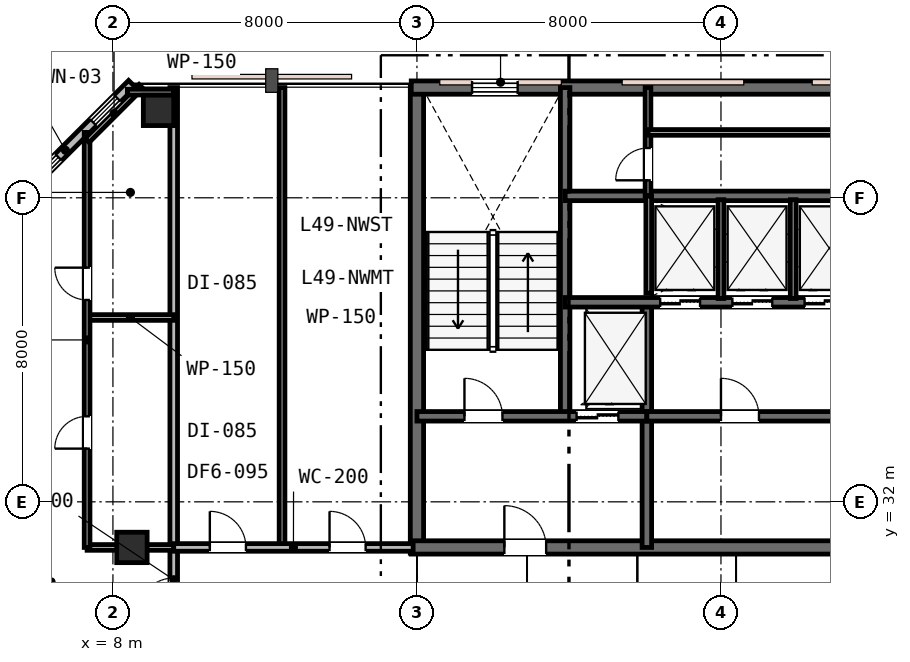
"""IFC4 building model, lengths in metres.
Left out: names, types, materials, properties, quantities, classifications, styles, units other than length and angle.
Written with IfcOpenShell. Run it as: python <this file> out.ifc"""

import sys

from ifc_helpers import new_model, si_unit, direction, frame, frame_2d, origin, origin_2d, place, context, subcontext, project, spatial, rectangle, extrude, element, fill, save


model = new_model("IFC4")
c1 = context("Model", 3, precision=1e-05, world=origin(), true_north=direction((0.0, 1.0)))
c2 = subcontext(c1, "Body", "Model", "MODEL_VIEW")
j1 = project(units=[si_unit("LENGTHUNIT", "METRE"), si_unit("PLANEANGLEUNIT", "RADIAN")], contexts=[c1])
p1 = place(None, origin())
s1 = spatial("IfcSite", under=j1, at=p1, CompositionType="ELEMENT")
p2 = place(p1, origin())
s2 = spatial("IfcBuilding", under=s1, at=p2, CompositionType="ELEMENT")
p3 = place(p2, frame((0.0, 0.0, 190.2)))
s3 = spatial("IfcBuildingStorey", under=s2, at=p3, CompositionType="ELEMENT", Elevation=190.2)
p4 = place(p3, frame((16.0, 30.65, 0.0), z_axis=(0.0, 0.0, 1.0), x_axis=(0.0, 1.0, 0.0)))
e1 = element("IfcWall", 1, at=p4, inside=s3, PredefinedType="SHEAR", context=c2, shape_type="SweptSolid", body=[
    extrude(rectangle(XDim=12.3, YDim=0.35, at=frame_2d((6.15, 0.0))), origin(), (0.0, 0.0, 1.0), 3.6),
])
p5 = place(p3, frame((15.85, 42.9, 0.0), z_axis=(0.0, 0.0, 1.0), x_axis=(1.0, 0.0, 0.0)))
e2 = element("IfcWall", 2, at=p5, inside=s3, PredefinedType="SHEAR", context=c2, shape_type="SweptSolid", body=[
    extrude(rectangle(XDim=24.3, YDim=0.35, at=frame_2d((12.15, 0.0))), origin(), (0.0, 0.0, 1.0), 3.6),
])
p6 = place(p5, frame((1.6, 0.0, 0.95)))
e3 = element("IfcOpeningElement", 3, at=p6, cuts=e2, PredefinedType="OPENING", context=c2, shape_type="SweptSolid", body=[
    extrude(rectangle(XDim=1.2, YDim=1.6, at=frame_2d((0.6, 0.8))), frame((0.0, 0.185, 0.0), z_axis=(0.0, -1.0, 0.0), x_axis=(1.0, 0.0, 0.0)), (0.0, 0.0, 1.0), 0.37),
])
p7 = place(p5, frame((16.5, 0.0, 0.95)))
e4 = element("IfcOpeningElement", 4, at=p7, cuts=e2, PredefinedType="OPENING", context=c2, shape_type="SweptSolid", body=[
    extrude(rectangle(XDim=1.2, YDim=1.6, at=frame_2d((0.6, 0.8))), frame((0.0, 0.185, 0.0), z_axis=(0.0, -1.0, 0.0), x_axis=(1.0, 0.0, 0.0)), (0.0, 0.0, 1.0), 0.37),
])
p8 = place(p5, frame((21.6, 0.0, 0.95)))
e5 = element("IfcOpeningElement", 5, at=p8, cuts=e2, PredefinedType="OPENING", context=c2, shape_type="SweptSolid", body=[
    extrude(rectangle(XDim=1.2, YDim=1.6, at=frame_2d((0.6, 0.8))), frame((0.0, 0.185, 0.0), z_axis=(0.0, -1.0, 0.0), x_axis=(1.0, 0.0, 0.0)), (0.0, 0.0, 1.0), 0.37),
])
p9 = place(p3, frame((15.85, 30.8, 0.0), z_axis=(0.0, 0.0, 1.0), x_axis=(1.0, 0.0, 0.0)))
e6 = element("IfcWall", 6, at=p9, inside=s3, PredefinedType="SHEAR", context=c2, shape_type="SweptSolid", body=[
    extrude(rectangle(XDim=11.2, YDim=0.35, at=frame_2d((5.6, 0.0))), origin(), (0.0, 0.0, 1.0), 3.6),
])
p10 = place(p9, frame((2.45, 0.0, 0.0)))
e7 = element("IfcOpeningElement", 7, at=p10, cuts=e6, PredefinedType="OPENING", context=c2, shape_type="SweptSolid", body=[
    extrude(rectangle(XDim=1.1, YDim=2.15, at=frame_2d((0.55, 1.075))), frame((0.0, 0.185, 0.0), z_axis=(0.0, -1.0, 0.0), x_axis=(1.0, 0.0, 0.0)), (0.0, 0.0, 1.0), 0.37),
])
p11 = place(p3, frame((19.9, 34.25, 0.0), z_axis=(0.0, 0.0, 1.0), x_axis=(0.0, 1.0, 0.0)))
e8 = element("IfcWall", 8, at=p11, inside=s3, PredefinedType="SHEAR", context=c2, shape_type="SweptSolid", body=[
    extrude(rectangle(XDim=8.65, YDim=0.25, at=frame_2d((4.325, 0.0))), origin(), (0.0, 0.0, 1.0), 3.6),
])
p12 = place(p3, frame((22.05, 30.8, 0.0), z_axis=(0.0, 0.0, 1.0), x_axis=(0.0, 1.0, 0.0)))
e9 = element("IfcWall", 9, at=p12, inside=s3, PredefinedType="SHEAR", context=c2, shape_type="SweptSolid", body=[
    extrude(rectangle(XDim=6.45, YDim=0.25, at=frame_2d((3.225, 0.0))), origin(), (0.0, 0.0, 1.0), 3.6),
])
p13 = place(p3, frame((16.0, 34.25, 0.0), z_axis=(0.0, 0.0, 1.0), x_axis=(1.0, 0.0, 0.0)))
e10 = element("IfcWall", 10, at=p13, inside=s3, PredefinedType="SHEAR", context=c2, shape_type="SweptSolid", body=[
    extrude(rectangle(XDim=6.05, YDim=0.25, at=frame_2d((3.025, 0.0))), origin(), (0.0, 0.0, 1.0), 3.6),
])
p14 = place(p13, frame((1.25, 0.0, 0.0)))
e11 = element("IfcOpeningElement", 11, at=p14, cuts=e10, PredefinedType="OPENING", context=c2, shape_type="SweptSolid", body=[
    extrude(rectangle(XDim=1.0, YDim=2.15, at=frame_2d((0.5, 1.075))), frame((0.0, 0.135, 0.0), z_axis=(0.0, -1.0, 0.0), x_axis=(1.0, 0.0, 0.0)), (0.0, 0.0, 1.0), 0.27),
])
p15 = place(p13, frame((4.2, 0.0, 0.0)))
e12 = element("IfcOpeningElement", 12, at=p15, cuts=e10, PredefinedType="OPENING", context=c2, shape_type="SweptSolid", body=[
    extrude(rectangle(XDim=1.1, YDim=2.15, at=frame_2d((0.55, 1.075))), frame((0.0, 0.135, 0.0), z_axis=(0.0, -1.0, 0.0), x_axis=(1.0, 0.0, 0.0)), (0.0, 0.0, 1.0), 0.27),
])
p16 = place(p3, frame((22.05, 34.25, 0.0), z_axis=(0.0, 0.0, 1.0), x_axis=(1.0, 0.0, 0.0)))
e13 = element("IfcWall", 13, at=p16, inside=s3, PredefinedType="SHEAR", context=c2, shape_type="SweptSolid", body=[
    extrude(rectangle(XDim=5.0, YDim=0.25, at=frame_2d((2.5, 0.0))), origin(), (0.0, 0.0, 1.0), 3.6),
])
p17 = place(p16, frame((1.95, 0.0, 0.0)))
e14 = element("IfcOpeningElement", 14, at=p17, cuts=e13, PredefinedType="OPENING", context=c2, shape_type="SweptSolid", body=[
    extrude(rectangle(XDim=1.0, YDim=2.15, at=frame_2d((0.5, 1.075))), frame((0.0, 0.135, 0.0), z_axis=(0.0, -1.0, 0.0), x_axis=(1.0, 0.0, 0.0)), (0.0, 0.0, 1.0), 0.27),
])
p18 = place(p3, frame((19.9, 37.25, 0.0), z_axis=(0.0, 0.0, 1.0), x_axis=(1.0, 0.0, 0.0)))
e15 = element("IfcWall", 15, at=p18, inside=s3, PredefinedType="SHEAR", context=c2, shape_type="SweptSolid", body=[
    extrude(rectangle(XDim=16.2, YDim=0.25, at=frame_2d((8.1, 0.0))), origin(), (0.0, 0.0, 1.0), 3.6),
])
p19 = place(p18, frame((12.55, 0.0, 0.0)))
e16 = element("IfcOpeningElement", 16, at=p19, cuts=e15, PredefinedType="OPENING", context=c2, shape_type="SweptSolid", body=[
    extrude(rectangle(XDim=0.9, YDim=2.15, at=frame_2d((0.45, 1.075))), frame((0.0, 0.135, 0.0), z_axis=(0.0, -1.0, 0.0), x_axis=(1.0, 0.0, 0.0)), (0.0, 0.0, 1.0), 0.27),
])
p20 = place(p18, frame((2.5, 0.0, 0.0)))
e17 = element("IfcOpeningElement", 17, at=p20, cuts=e15, PredefinedType="OPENING", context=c2, shape_type="SweptSolid", body=[
    extrude(rectangle(XDim=1.05, YDim=2.15, at=frame_2d((0.525, 1.075))), frame((0.0, 0.135, 0.0), z_axis=(0.0, -1.0, 0.0), x_axis=(1.0, 0.0, 0.0)), (0.0, 0.0, 1.0), 0.27),
])
p21 = place(p18, frame((4.4, 0.0, 0.0)))
e18 = element("IfcOpeningElement", 18, at=p21, cuts=e15, PredefinedType="OPENING", context=c2, shape_type="SweptSolid", body=[
    extrude(rectangle(XDim=1.05, YDim=2.15, at=frame_2d((0.525, 1.075))), frame((0.0, 0.135, 0.0), z_axis=(0.0, -1.0, 0.0), x_axis=(1.0, 0.0, 0.0)), (0.0, 0.0, 1.0), 0.27),
])
p22 = place(p18, frame((6.3, 0.0, 0.0)))
e19 = element("IfcOpeningElement", 19, at=p22, cuts=e15, PredefinedType="OPENING", context=c2, shape_type="SweptSolid", body=[
    extrude(rectangle(XDim=1.05, YDim=2.15, at=frame_2d((0.525, 1.075))), frame((0.0, 0.135, 0.0), z_axis=(0.0, -1.0, 0.0), x_axis=(1.0, 0.0, 0.0)), (0.0, 0.0, 1.0), 0.27),
])
p23 = place(p3, frame((19.9, 40.05, 0.0), z_axis=(0.0, 0.0, 1.0), x_axis=(1.0, 0.0, 0.0)))
e20 = element("IfcWall", 20, at=p23, inside=s3, PredefinedType="SHEAR", context=c2, shape_type="SweptSolid", body=[
    extrude(rectangle(XDim=12.05, YDim=0.25, at=frame_2d((6.025, 0.0))), origin(), (0.0, 0.0, 1.0), 3.6),
])
for number, where, z_axis, x_axis in (
    (21, (8.5, 30.8, 0.0), (0.0, 0.0, 1.0), (1.0, 0.0, 0.0)),
    (22, (9.2, 42.3, 0.0), (0.0, 0.0, 1.0), (1.0, 0.0, 0.0)),
):
    element("IfcColumn", number, at=place(p3, frame(where, z_axis=z_axis, x_axis=x_axis)), inside=s3, PredefinedType="COLUMN", context=c2, shape_type="SweptSolid", body=[
        extrude(rectangle(XDim=0.8, YDim=0.8, at=origin_2d()), origin(), (0.0, 0.0, 1.0), 3.6),
    ])
p24 = place(p3, frame((8.5, 43.0, 0.0), z_axis=(0.0, 0.0, 1.0), x_axis=(-0.707106781187, -0.707106781187, 0.0)))
e23 = element("IfcWall", 23, at=p24, inside=s3, PredefinedType="STANDARD", context=c2, shape_type="SweptSolid", body=[
    extrude(rectangle(XDim=4.95, YDim=0.25, at=frame_2d((2.475, 0.0))), origin(), (0.0, 0.0, 1.0), 3.33),
])
p25 = place(p24, frame((0.54, 0.0, 0.9)))
e24 = element("IfcOpeningElement", 24, at=p25, cuts=e23, PredefinedType="OPENING", context=c2, shape_type="SweptSolid", body=[
    extrude(rectangle(XDim=0.9, YDim=1.55, at=frame_2d((0.45, 0.775))), frame((0.0, 0.135, 0.0), z_axis=(0.0, -1.0, 0.0), x_axis=(1.0, 0.0, 0.0)), (0.0, 0.0, 1.0), 0.27),
])
p26 = place(p24, frame((2.735, 0.0, 0.85)))
e25 = element("IfcOpeningElement", 25, at=p26, cuts=e23, PredefinedType="OPENING", context=c2, shape_type="SweptSolid", body=[
    extrude(rectangle(XDim=1.2, YDim=1.6, at=frame_2d((0.6, 0.8))), frame((0.0, 0.135, 0.0), z_axis=(0.0, -1.0, 0.0), x_axis=(1.0, 0.0, 0.0)), (0.0, 0.0, 1.0), 0.27),
])
p27 = place(p3, frame((22.1, 37.49, 0.0), z_axis=(0.0, 0.0, 1.0), x_axis=(0.0, 1.0, 0.0)))
e26 = element("IfcWall", 26, at=p27, inside=s3, PredefinedType="PLUMBINGWALL", context=c2, shape_type="SweptSolid", body=[
    extrude(rectangle(XDim=2.56, YDim=0.15, at=frame_2d((1.28, 0.0))), origin(), (0.0, 0.0, 1.0), 3.33),
])
for number, where, z_axis, x_axis in (
    (27, (24.0, 37.35, 0.0), (0.0, 0.0, 1.0), (0.0, 1.0, 0.0)),
    (28, (25.9, 37.35, 0.0), (0.0, 0.0, 1.0), (0.0, 1.0, 0.0)),
):
    element("IfcWall", number, at=place(p3, frame(where, z_axis=z_axis, x_axis=x_axis)), inside=s3, PredefinedType="PLUMBINGWALL", context=c2, shape_type="SweptSolid", body=[
        extrude(rectangle(XDim=2.6, YDim=0.15, at=frame_2d((1.3, 0.0))), origin(), (0.0, 0.0, 1.0), 3.33),
    ])
p28 = place(p3, frame((22.08, 40.05, 0.0), z_axis=(0.0, 0.0, 1.0), x_axis=(0.0, 1.0, 0.0)))
e29 = element("IfcWall", 29, at=p28, inside=s3, PredefinedType="PARTITIONING", context=c2, shape_type="SweptSolid", body=[
    extrude(rectangle(XDim=2.85, YDim=0.15, at=frame_2d((1.425, 0.0))), origin(), (0.0, 0.0, 1.0), 3.33),
])
p29 = place(p28, frame((0.41, 0.0, 0.0)))
e30 = element("IfcOpeningElement", 30, at=p29, cuts=e29, PredefinedType="OPENING", context=c2, shape_type="SweptSolid", body=[
    extrude(rectangle(XDim=0.85, YDim=2.15, at=frame_2d((0.425, 1.075))), frame((0.0, 0.085, 0.0), z_axis=(0.0, -1.0, 0.0), x_axis=(1.0, 0.0, 0.0)), (0.0, 0.0, 1.0), 0.17),
])
p30 = place(p3, frame((22.08, 41.72, 0.0), z_axis=(0.0, 0.0, 1.0), x_axis=(1.0, 0.0, 0.0)))
e31 = element("IfcWall", 31, at=p30, inside=s3, PredefinedType="PARTITIONING", context=c2, shape_type="SweptSolid", body=[
    extrude(rectangle(XDim=11.97, YDim=0.15, at=frame_2d((5.985, 0.0))), origin(), (0.0, 0.0, 1.0), 3.33),
])
p31 = place(p30, frame((5.535, 0.0, 0.0)))
e32 = element("IfcOpeningElement", 32, at=p31, cuts=e31, PredefinedType="OPENING", context=c2, shape_type="SweptSolid", body=[
    extrude(rectangle(XDim=0.9, YDim=2.15, at=frame_2d((0.45, 1.075))), frame((0.0, 0.085, 0.0), z_axis=(0.0, -1.0, 0.0), x_axis=(1.0, 0.0, 0.0)), (0.0, 0.0, 1.0), 0.17),
])
p32 = place(p3, frame((9.6, 17.0, 0.0), z_axis=(0.0, 0.0, 1.0), x_axis=(0.0, 1.0, 0.0)))
e33 = element("IfcWall", 33, at=p32, inside=s3, PredefinedType="PARTITIONING", context=c2, shape_type="SweptSolid", body=[
    extrude(rectangle(XDim=25.9, YDim=0.2, at=frame_2d((12.95, 0.0))), origin(), (0.0, 0.0, 1.0), 2.92),
])
p33 = place(p32, frame((12.045, 0.0, 0.0)))
e34 = element("IfcOpeningElement", 34, at=p33, cuts=e33, PredefinedType="OPENING", context=c2, shape_type="SweptSolid", body=[
    extrude(rectangle(XDim=0.95, YDim=2.15, at=frame_2d((0.475, 1.075))), frame((0.0, 0.11, 0.0), z_axis=(0.0, -1.0, 0.0), x_axis=(1.0, 0.0, 0.0)), (0.0, 0.0, 1.0), 0.22),
])
p34 = place(p32, frame((3.125, 0.0, 0.0)))
e35 = element("IfcOpeningElement", 35, at=p34, cuts=e33, PredefinedType="OPENING", context=c2, shape_type="SweptSolid", body=[
    extrude(rectangle(XDim=0.95, YDim=2.15, at=frame_2d((0.475, 1.075))), frame((0.0, 0.11, 0.0), z_axis=(0.0, -1.0, 0.0), x_axis=(1.0, 0.0, 0.0)), (0.0, 0.0, 1.0), 0.22),
])
p35 = place(p3, frame((7.32, 30.8, 0.0), z_axis=(0.0, 0.0, 1.0), x_axis=(1.0, 0.0, 0.0)))
e36 = element("IfcWall", 36, at=p35, inside=s3, PredefinedType="PARTITIONING", context=c2, shape_type="SweptSolid", body=[
    extrude(rectangle(XDim=2.28, YDim=0.15, at=frame_2d((1.14, 0.0))), origin(), (0.0, 0.0, 1.0), 2.92),
])
p36 = place(p3, frame((7.32, 36.85, 0.0), z_axis=(0.0, 0.0, 1.0), x_axis=(1.0, 0.0, 0.0)))
e37 = element("IfcWall", 37, at=p36, inside=s3, PredefinedType="PARTITIONING", context=c2, shape_type="SweptSolid", body=[
    extrude(rectangle(XDim=2.28, YDim=0.15, at=frame_2d((1.14, 0.0))), origin(), (0.0, 0.0, 1.0), 3.33),
])
p37 = place(p3, frame((7.32, 30.8, 0.0), z_axis=(0.0, 0.0, 1.0), x_axis=(0.0, 1.0, 0.0)))
e38 = element("IfcWall", 38, at=p37, inside=s3, PredefinedType="PARTITIONING", context=c2, shape_type="SweptSolid", body=[
    extrude(rectangle(XDim=10.92, YDim=0.15, at=frame_2d((5.46, 0.0))), origin(), (0.0, 0.0, 1.0), 2.92),
])
p38 = place(p37, frame((2.6, 0.0, 0.0)))
e39 = element("IfcOpeningElement", 39, at=p38, cuts=e38, PredefinedType="OPENING", context=c2, shape_type="SweptSolid", body=[
    extrude(rectangle(XDim=0.85, YDim=2.15, at=frame_2d((0.425, 1.075))), frame((0.0, 0.085, 0.0), z_axis=(0.0, -1.0, 0.0), x_axis=(1.0, 0.0, 0.0)), (0.0, 0.0, 1.0), 0.17),
])
p39 = place(p37, frame((6.512, 0.0, 0.0)))
e40 = element("IfcOpeningElement", 40, at=p39, cuts=e38, PredefinedType="OPENING", context=c2, shape_type="SweptSolid", body=[
    extrude(rectangle(XDim=0.85, YDim=2.15, at=frame_2d((0.425, 1.075))), frame((0.0, 0.085, 0.0), z_axis=(0.0, -1.0, 0.0), x_axis=(1.0, 0.0, 0.0)), (0.0, 0.0, 1.0), 0.17),
])
p40 = place(p3, frame((7.32, 41.509, 0.0), z_axis=(0.0, 0.0, 1.0), x_axis=(0.707106781187, 0.707106781187, 0.0)))
e41 = element("IfcWall", 41, at=p40, inside=s3, PredefinedType="PARTITIONING", context=c2, shape_type="SweptSolid", body=[
    extrude(rectangle(XDim=2.009, YDim=0.15, at=frame_2d((1.004, 0.0))), origin(), (0.0, 0.0, 1.0), 3.33),
])
p41 = place(p3, frame((8.38, 42.78, 0.0), z_axis=(0.0, 0.0, 1.0), x_axis=(1.0, 0.0, 0.0)))
e42 = element("IfcWall", 42, at=p41, inside=s3, PredefinedType="PARTITIONING", context=c2, shape_type="SweptSolid", body=[
    extrude(rectangle(XDim=1.22, YDim=0.15, at=frame_2d((0.61, 0.0))), origin(), (0.0, 0.0, 1.0), 3.02),
])
p42 = place(p3, frame((12.45, 30.8, 0.0), z_axis=(0.0, 0.0, 1.0), x_axis=(0.0, 1.0, 0.0)))
e43 = element("IfcWall", 43, at=p42, inside=s3, PredefinedType="PARTITIONING", context=c2, shape_type="SweptSolid", body=[
    extrude(rectangle(XDim=12.1, YDim=0.15, at=frame_2d((6.05, 0.0))), origin(), (0.0, 0.0, 1.0), 2.92),
])
p43 = place(p3, frame((9.6, 30.8, 0.0), z_axis=(0.0, 0.0, 1.0), x_axis=(1.0, 0.0, 0.0)))
e44 = element("IfcWall", 44, at=p43, inside=s3, PredefinedType="PARTITIONING", context=c2, shape_type="SweptSolid", body=[
    extrude(rectangle(XDim=6.3, YDim=0.2, at=frame_2d((3.15, 0.0))), origin(), (0.0, 0.0, 1.0), 2.92),
])
p44 = place(p43, frame((0.95, 0.0, 0.0)))
e45 = element("IfcOpeningElement", 45, at=p44, cuts=e44, PredefinedType="OPENING", context=c2, shape_type="SweptSolid", body=[
    extrude(rectangle(XDim=0.95, YDim=2.15, at=frame_2d((0.475, 1.075))), frame((0.0, 0.11, 0.0), z_axis=(0.0, -1.0, 0.0), x_axis=(1.0, 0.0, 0.0)), (0.0, 0.0, 1.0), 0.22),
])
p45 = place(p43, frame((4.1, 0.0, 0.0)))
e46 = element("IfcOpeningElement", 46, at=p45, cuts=e44, PredefinedType="OPENING", context=c2, shape_type="SweptSolid", body=[
    extrude(rectangle(XDim=0.95, YDim=2.15, at=frame_2d((0.475, 1.075))), frame((0.0, 0.11, 0.0), z_axis=(0.0, -1.0, 0.0), x_axis=(1.0, 0.0, 0.0)), (0.0, 0.0, 1.0), 0.22),
])
p46 = place(p6, origin())
e47 = element("IfcWindow", 47, at=p46, inside=s3, PartitioningType="SINGLE_PANEL", PredefinedType="WINDOW", context=c2, shape_type="SweptSolid", body=[
    extrude(rectangle(XDim=1.2, YDim=1.6, at=frame_2d((0.6, 0.8))), frame((0.0, 0.03, 0.0), z_axis=(0.0, -1.0, 0.0), x_axis=(1.0, 0.0, 0.0)), (0.0, 0.0, 1.0), 0.06),
])
fill(e3, e47)
p47 = place(p25, origin())
e48 = element("IfcWindow", 48, at=p47, inside=s3, PartitioningType="SINGLE_PANEL", PredefinedType="WINDOW", context=c2, shape_type="SweptSolid", body=[
    extrude(rectangle(XDim=0.9, YDim=1.55, at=frame_2d((0.45, 0.775))), frame((0.0, 0.03, 0.0), z_axis=(0.0, -1.0, 0.0), x_axis=(1.0, 0.0, 0.0)), (0.0, 0.0, 1.0), 0.06),
])
fill(e24, e48)
p48 = place(p26, origin())
e49 = element("IfcWindow", 49, at=p48, inside=s3, PartitioningType="SINGLE_PANEL", PredefinedType="WINDOW", context=c2, shape_type="SweptSolid", body=[
    extrude(rectangle(XDim=1.2, YDim=1.6, at=frame_2d((0.6, 0.8))), frame((0.0, 0.03, 0.0), z_axis=(0.0, -1.0, 0.0), x_axis=(1.0, 0.0, 0.0)), (0.0, 0.0, 1.0), 0.06),
])
fill(e25, e49)
p49 = place(p14, origin())
e50 = element("IfcDoor", 50, at=p49, inside=s3, OperationType="SINGLE_SWING_LEFT", PredefinedType="DOOR", context=c2, shape_type="SweptSolid", body=[
    extrude(rectangle(XDim=1.0, YDim=2.15, at=frame_2d((0.5, 1.075))), frame((0.0, 0.025, 0.0), z_axis=(0.0, -1.0, 0.0), x_axis=(1.0, 0.0, 0.0)), (0.0, 0.0, 1.0), 0.05),
])
fill(e11, e50)
p50 = place(p10, origin())
e51 = element("IfcDoor", 51, at=p50, inside=s3, OperationType="SINGLE_SWING_LEFT", PredefinedType="DOOR", context=c2, shape_type="SweptSolid", body=[
    extrude(rectangle(XDim=1.1, YDim=2.15, at=frame_2d((0.55, 1.075))), frame((0.0, 0.025, 0.0), z_axis=(0.0, -1.0, 0.0), x_axis=(1.0, 0.0, 0.0)), (0.0, 0.0, 1.0), 0.05),
])
fill(e7, e51)
p51 = place(p17, origin())
e52 = element("IfcDoor", 52, at=p51, inside=s3, OperationType="SINGLE_SWING_LEFT", PredefinedType="DOOR", context=c2, shape_type="SweptSolid", body=[
    extrude(rectangle(XDim=1.0, YDim=2.15, at=frame_2d((0.5, 1.075))), frame((0.0, 0.025, 0.0), z_axis=(0.0, -1.0, 0.0), x_axis=(1.0, 0.0, 0.0)), (0.0, 0.0, 1.0), 0.05),
])
fill(e14, e52)
p52 = place(p29, origin())
e53 = element("IfcDoor", 53, at=p52, inside=s3, OperationType="SINGLE_SWING_LEFT", PredefinedType="DOOR", context=c2, shape_type="SweptSolid", body=[
    extrude(rectangle(XDim=0.85, YDim=2.15, at=frame_2d((0.425, 1.075))), frame((0.0, 0.025, 0.0), z_axis=(0.0, -1.0, 0.0), x_axis=(1.0, 0.0, 0.0)), (0.0, 0.0, 1.0), 0.05),
])
fill(e30, e53)
p53 = place(p33, origin())
e54 = element("IfcDoor", 54, at=p53, inside=s3, OperationType="SINGLE_SWING_LEFT", PredefinedType="DOOR", context=c2, shape_type="SweptSolid", body=[
    extrude(rectangle(XDim=0.95, YDim=2.15, at=frame_2d((0.475, 1.075))), frame((0.0, 0.025, 0.0), z_axis=(0.0, -1.0, 0.0), x_axis=(1.0, 0.0, 0.0)), (0.0, 0.0, 1.0), 0.05),
])
fill(e34, e54)
p54 = place(p38, origin())
e55 = element("IfcDoor", 55, at=p54, inside=s3, OperationType="SINGLE_SWING_LEFT", PredefinedType="DOOR", context=c2, shape_type="SweptSolid", body=[
    extrude(rectangle(XDim=0.85, YDim=2.15, at=frame_2d((0.425, 1.075))), frame((0.0, 0.025, 0.0), z_axis=(0.0, -1.0, 0.0), x_axis=(1.0, 0.0, 0.0)), (0.0, 0.0, 1.0), 0.05),
])
fill(e39, e55)
p55 = place(p39, origin())
e56 = element("IfcDoor", 56, at=p55, inside=s3, OperationType="SINGLE_SWING_RIGHT", PredefinedType="DOOR", context=c2, shape_type="SweptSolid", body=[
    extrude(rectangle(XDim=0.85, YDim=2.15, at=frame_2d((0.425, 1.075))), frame((0.0, 0.025, 0.0), z_axis=(0.0, -1.0, 0.0), x_axis=(1.0, 0.0, 0.0)), (0.0, 0.0, 1.0), 0.05),
])
fill(e40, e56)
p56 = place(p44, origin())
e57 = element("IfcDoor", 57, at=p56, inside=s3, OperationType="SINGLE_SWING_LEFT", PredefinedType="DOOR", context=c2, shape_type="SweptSolid", body=[
    extrude(rectangle(XDim=0.95, YDim=2.15, at=frame_2d((0.475, 1.075))), frame((0.0, 0.025, 0.0), z_axis=(0.0, -1.0, 0.0), x_axis=(1.0, 0.0, 0.0)), (0.0, 0.0, 1.0), 0.05),
])
fill(e45, e57)
p57 = place(p45, origin())
e58 = element("IfcDoor", 58, at=p57, inside=s3, OperationType="SINGLE_SWING_LEFT", PredefinedType="DOOR", context=c2, shape_type="SweptSolid", body=[
    extrude(rectangle(XDim=0.95, YDim=2.15, at=frame_2d((0.475, 1.075))), frame((0.0, 0.025, 0.0), z_axis=(0.0, -1.0, 0.0), x_axis=(1.0, 0.0, 0.0)), (0.0, 0.0, 1.0), 0.05),
])
fill(e46, e58)
p58 = place(p15, origin())
e59 = element("IfcDoor", 59, at=p58, inside=s3, OperationType="DOUBLE_DOOR_SLIDING", PredefinedType="DOOR", context=c2, shape_type="SweptSolid", body=[
    extrude(rectangle(XDim=1.1, YDim=2.15, at=frame_2d((0.55, 1.075))), frame((0.0, 0.025, 0.0), z_axis=(0.0, -1.0, 0.0), x_axis=(1.0, 0.0, 0.0)), (0.0, 0.0, 1.0), 0.05),
])
fill(e12, e59)
p59 = place(p20, origin())
e60 = element("IfcDoor", 60, at=p59, inside=s3, OperationType="DOUBLE_DOOR_SLIDING", PredefinedType="DOOR", context=c2, shape_type="SweptSolid", body=[
    extrude(rectangle(XDim=1.05, YDim=2.15, at=frame_2d((0.525, 1.075))), frame((0.0, 0.025, 0.0), z_axis=(0.0, -1.0, 0.0), x_axis=(1.0, 0.0, 0.0)), (0.0, 0.0, 1.0), 0.05),
])
fill(e17, e60)
p60 = place(p21, origin())
e61 = element("IfcDoor", 61, at=p60, inside=s3, OperationType="DOUBLE_DOOR_SLIDING", PredefinedType="DOOR", context=c2, shape_type="SweptSolid", body=[
    extrude(rectangle(XDim=1.05, YDim=2.15, at=frame_2d((0.525, 1.075))), frame((0.0, 0.025, 0.0), z_axis=(0.0, -1.0, 0.0), x_axis=(1.0, 0.0, 0.0)), (0.0, 0.0, 1.0), 0.05),
])
fill(e18, e61)
p61 = place(p22, origin())
e62 = element("IfcDoor", 62, at=p61, inside=s3, OperationType="DOUBLE_DOOR_SLIDING", PredefinedType="DOOR", context=c2, shape_type="SweptSolid", body=[
    extrude(rectangle(XDim=1.05, YDim=2.15, at=frame_2d((0.525, 1.075))), frame((0.0, 0.025, 0.0), z_axis=(0.0, -1.0, 0.0), x_axis=(1.0, 0.0, 0.0)), (0.0, 0.0, 1.0), 0.05),
])
fill(e19, e62)
save(model, sys.argv[1])
